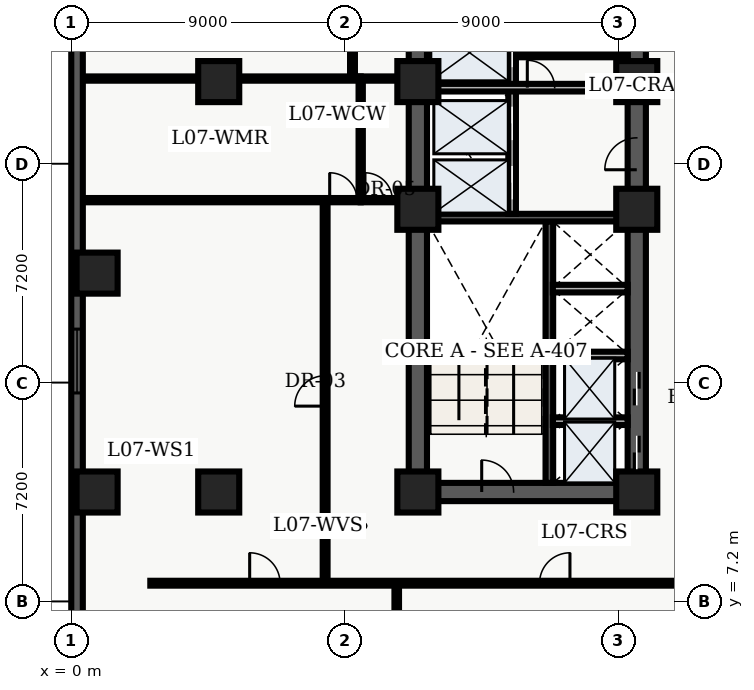
"""IFC4 building model, lengths in metres.
Left out: names, types, materials, properties, quantities, classifications, styles, units other than length and angle.
Written with IfcOpenShell. Run it as: python <this file> out.ifc"""

import sys

from ifc_helpers import new_model, entity, si_unit, converted_unit, direction, frame, origin_with_axes, origin_2d_with_axis, place, context, subcontext, project, spatial, polyline, rectangle, outline, extrude, element, fill, save


model = new_model("IFC4")
c1 = context("Model", 3, precision=1e-05, world=origin_with_axes(), true_north=direction((0.0, 1.0)))
c2 = subcontext(c1, "Body", "Model", "MODEL_VIEW")
j1 = project(units=[si_unit("LENGTHUNIT", "METRE"), converted_unit("PLANEANGLEUNIT", "DEGREE", entity("IfcPlaneAngleMeasure", 0.017), si_unit("PLANEANGLEUNIT", "RADIAN"), dimensions=[0, 0, 0, 0, 0, 0, 0])], contexts=[c1])
p1 = place(None, origin_with_axes())
s1 = spatial("IfcSite", under=j1, at=p1, CompositionType="ELEMENT")
p2 = place(p1, origin_with_axes())
s2 = spatial("IfcBuilding", under=s1, at=p2, CompositionType="ELEMENT")
p3 = place(p2, frame((0.0, 0.0, 32.7), z_axis=(0.0, 0.0, 1.0), x_axis=(1.0, 0.0, 0.0)))
s3 = spatial("IfcBuildingStorey", under=s2, at=p3, CompositionType="ELEMENT", Elevation=32.7)
p4 = place(p3, frame((11.4, 10.8, 0.0), z_axis=(0.0, 0.0, 1.0), x_axis=(0.0, 1.0, 0.0)))
e1 = element("IfcWall", 1, at=p4, inside=s3, PredefinedType="SHEAR", context=c2, shape_type="SweptSolid", body=[
    extrude(outline(polyline([(0.0, -0.3), (27.0, -0.3), (27.0, 0.3), (0.0, 0.3), (0.0, -0.3)])), origin_with_axes(), (0.0, 0.0, 1.0), 3.66),
])
p5 = place(p3, frame((11.4, 10.8, 0.0), z_axis=(0.0, 0.0, 1.0), x_axis=(1.0, 0.0, 0.0)))
e2 = element("IfcWall", 2, at=p5, inside=s3, PredefinedType="SHEAR", context=c2, shape_type="SweptSolid", body=[
    extrude(outline(polyline([(0.0, -0.3), (7.2, -0.3), (7.2, 0.3), (0.0, 0.3), (0.0, -0.3)])), origin_with_axes(), (0.0, 0.0, 1.0), 3.66),
])
p6 = place(p5, frame((2.625, 0.0, 0.0), z_axis=(0.0, 0.0, 1.0), x_axis=(1.0, 0.0, 0.0)))
e3 = element("IfcOpeningElement", 3, at=p6, cuts=e2, PredefinedType="OPENING", context=c2, shape_type="SweptSolid", body=[
    extrude(rectangle(XDim=1.05, YDim=0.62, at=origin_2d_with_axis()), origin_with_axes(), (0.0, 0.0, 1.0), 2.15),
])
p7 = place(p3, frame((18.6, 10.8, 0.0), z_axis=(0.0, 0.0, 1.0), x_axis=(0.0, 1.0, 0.0)))
e4 = element("IfcWall", 4, at=p7, inside=s3, PredefinedType="SHEAR", context=c2, shape_type="SweptSolid", body=[
    extrude(outline(polyline([(0.0, -0.3), (13.5, -0.3), (13.5, 0.3), (0.0, 0.3), (0.0, -0.3)])), origin_with_axes(), (0.0, 0.0, 1.0), 3.66),
])
p8 = place(p7, frame((1.3, 0.0, 0.0), z_axis=(0.0, 0.0, 1.0), x_axis=(1.0, 0.0, 0.0)))
e5 = element("IfcOpeningElement", 5, at=p8, cuts=e4, PredefinedType="OPENING", context=c2, shape_type="SweptSolid", body=[
    extrude(rectangle(XDim=1.1, YDim=0.62, at=origin_2d_with_axis()), origin_with_axes(), (0.0, 0.0, 1.0), 2.15),
])
p9 = place(p7, frame((3.4, 0.0, 0.0), z_axis=(0.0, 0.0, 1.0), x_axis=(1.0, 0.0, 0.0)))
e6 = element("IfcOpeningElement", 6, at=p9, cuts=e4, PredefinedType="OPENING", context=c2, shape_type="SweptSolid", body=[
    extrude(rectangle(XDim=1.1, YDim=0.62, at=origin_2d_with_axis()), origin_with_axes(), (0.0, 0.0, 1.0), 2.15),
])
p10 = place(p7, frame((11.125, 0.0, 0.0), z_axis=(0.0, 0.0, 1.0), x_axis=(1.0, 0.0, 0.0)))
e7 = element("IfcOpeningElement", 7, at=p10, cuts=e4, PredefinedType="OPENING", context=c2, shape_type="SweptSolid", body=[
    extrude(rectangle(XDim=1.05, YDim=0.62, at=origin_2d_with_axis()), origin_with_axes(), (0.0, 0.0, 1.0), 2.15),
])
p11 = place(p3, frame((18.6, 24.3, 0.0), z_axis=(0.0, 0.0, 1.0), x_axis=(0.0, 1.0, 0.0)))
e8 = element("IfcWall", 8, at=p11, inside=s3, PredefinedType="SHEAR", context=c2, shape_type="SweptSolid", body=[
    extrude(outline(polyline([(0.0, -0.3), (13.5, -0.3), (13.5, 0.3), (0.0, 0.3), (0.0, -0.3)])), origin_with_axes(), (0.0, 0.0, 1.0), 3.66),
])
p12 = place(p11, frame((6.025, 0.0, 0.0), z_axis=(0.0, 0.0, 1.0), x_axis=(1.0, 0.0, 0.0)))
e9 = element("IfcOpeningElement", 9, at=p12, cuts=e8, PredefinedType="OPENING", context=c2, shape_type="SweptSolid", body=[
    extrude(rectangle(XDim=0.95, YDim=0.62, at=origin_2d_with_axis()), origin_with_axes(), (0.0, 0.0, 1.0), 2.15),
])
p13 = place(p11, frame((7.825, 0.0, 0.0), z_axis=(0.0, 0.0, 1.0), x_axis=(1.0, 0.0, 0.0)))
e10 = element("IfcOpeningElement", 10, at=p13, cuts=e8, PredefinedType="OPENING", context=c2, shape_type="SweptSolid", body=[
    extrude(rectangle(XDim=0.95, YDim=0.62, at=origin_2d_with_axis()), origin_with_axes(), (0.0, 0.0, 1.0), 2.15),
])
p14 = place(p3, frame((15.725, 11.1, 0.0), z_axis=(0.0, 0.0, 1.0), x_axis=(0.0, 1.0, 0.0)))
e11 = element("IfcWall", 11, at=p14, inside=s3, PredefinedType="SHEAR", context=c2, shape_type="SweptSolid", body=[
    extrude(outline(polyline([(0.0, -0.125), (8.6, -0.125), (8.6, 0.125), (0.0, 0.125), (0.0, -0.125)])), origin_with_axes(), (0.0, 0.0, 1.0), 3.66),
])
p15 = place(p3, frame((11.7, 19.825, 0.0), z_axis=(0.0, 0.0, 1.0), x_axis=(1.0, 0.0, 0.0)))
e12 = element("IfcWall", 12, at=p15, inside=s3, PredefinedType="SHEAR", context=c2, shape_type="SweptSolid", body=[
    extrude(outline(polyline([(0.0, -0.125), (6.6, -0.125), (6.6, 0.125), (0.0, 0.125), (0.0, -0.125)])), origin_with_axes(), (0.0, 0.0, 1.0), 3.66),
])
p16 = place(p3, frame((14.5, 19.95, 0.0), z_axis=(0.0, 0.0, 1.0), x_axis=(0.0, 1.0, 0.0)))
e13 = element("IfcWall", 13, at=p16, inside=s3, PredefinedType="SOLIDWALL", context=c2, shape_type="SweptSolid", body=[
    extrude(outline(polyline([(0.0, -0.125), (6.25, -0.125), (6.25, 0.125), (0.0, 0.125), (0.0, -0.125)])), origin_with_axes(), (0.0, 0.0, 1.0), 2.7),
])
p17 = place(p16, frame((1.025, 0.0, 0.0), z_axis=(0.0, 0.0, 1.0), x_axis=(1.0, 0.0, 0.0)))
e14 = element("IfcOpeningElement", 14, at=p17, cuts=e13, PredefinedType="OPENING", context=c2, shape_type="SweptSolid", body=[
    extrude(rectangle(XDim=1.1, YDim=0.27, at=origin_2d_with_axis()), origin_with_axes(), (0.0, 0.0, 1.0), 2.15),
])
p18 = place(p16, frame((2.975, 0.0, 0.0), z_axis=(0.0, 0.0, 1.0), x_axis=(1.0, 0.0, 0.0)))
e15 = element("IfcOpeningElement", 15, at=p18, cuts=e13, PredefinedType="OPENING", context=c2, shape_type="SweptSolid", body=[
    extrude(rectangle(XDim=1.1, YDim=0.27, at=origin_2d_with_axis()), origin_with_axes(), (0.0, 0.0, 1.0), 2.15),
])
p19 = place(p16, frame((5.425, 0.0, 0.0), z_axis=(0.0, 0.0, 1.0), x_axis=(1.0, 0.0, 0.0)))
e16 = element("IfcOpeningElement", 16, at=p19, cuts=e13, PredefinedType="OPENING", context=c2, shape_type="SweptSolid", body=[
    extrude(rectangle(XDim=1.2, YDim=0.27, at=origin_2d_with_axis()), origin_with_axes(), (0.0, 0.0, 1.0), 2.15),
])
p20 = place(p3, frame((11.7, 24.1, 0.0), z_axis=(0.0, 0.0, 1.0), x_axis=(1.0, 0.0, 0.0)))
e17 = element("IfcWall", 17, at=p20, inside=s3, PredefinedType="SOLIDWALL", context=c2, shape_type="SweptSolid", body=[
    extrude(outline(polyline([(0.0, -0.125), (6.6, -0.125), (6.6, 0.125), (0.0, 0.125), (0.0, -0.125)])), origin_with_axes(), (0.0, 0.0, 1.0), 2.7),
])
p21 = place(p20, frame((3.75, 0.0, 0.0), z_axis=(0.0, 0.0, 1.0), x_axis=(1.0, 0.0, 0.0)))
e18 = element("IfcOpeningElement", 18, at=p21, cuts=e17, PredefinedType="OPENING", context=c2, shape_type="SweptSolid", body=[
    extrude(rectangle(XDim=0.9, YDim=0.27, at=origin_2d_with_axis()), origin_with_axes(), (0.0, 0.0, 1.0), 2.15),
])
for number, where, z_axis, x_axis in (
    (19, (11.4, 10.8, 0.0), (0.0, 0.0, 1.0), (1.0, 0.0, 0.0)),
    (20, (11.4, 20.1, 0.0), (0.0, 0.0, 1.0), (1.0, 0.0, 0.0)),
    (21, (11.4, 24.3, 0.0), (0.0, 0.0, 1.0), (1.0, 0.0, 0.0)),
    (22, (18.6, 10.8, 0.0), (0.0, 0.0, 1.0), (1.0, 0.0, 0.0)),
    (23, (18.6, 20.1, 0.0), (0.0, 0.0, 1.0), (1.0, 0.0, 0.0)),
    (24, (18.6, 24.3, 0.0), (0.0, 0.0, 1.0), (1.0, 0.0, 0.0)),
    (25, (4.85, 10.8, 0.0), (0.0, 0.0, 1.0), (1.0, 0.0, 0.0)),
    (26, (4.85, 24.3, 0.0), (0.0, 0.0, 1.0), (1.0, 0.0, 0.0)),
    (27, (0.85, 10.8, 0.0), (0.0, 0.0, 1.0), (1.0, 0.0, 0.0)),
    (28, (0.85, 18.0, 0.0), (0.0, 0.0, 1.0), (1.0, 0.0, 0.0)),
):
    element("IfcColumn", number, at=place(p3, frame(where, z_axis=z_axis, x_axis=x_axis)), inside=s3, PredefinedType="COLUMN", context=c2, shape_type="SweptSolid", body=[
        extrude(rectangle(XDim=1.35, YDim=1.35, at=origin_2d_with_axis()), origin_with_axes(), (0.0, 0.0, 1.0), 3.9),
    ])
p22 = place(p3, frame((14.62, 25.18, 0.0), z_axis=(0.0, 0.0, 1.0), x_axis=(1.0, 0.0, 0.0)))
e29 = element("IfcWall", 29, at=p22, inside=s3, PredefinedType="PARTITIONING", context=c2, shape_type="SweptSolid", body=[
    extrude(outline(polyline([(0.0, -0.08), (3.68, -0.08), (3.68, 0.08), (0.0, 0.08), (0.0, -0.08)])), origin_with_axes(), (0.0, 0.0, 1.0), 2.7),
])
p23 = place(p22, frame((1.95, 0.0, 0.0), z_axis=(0.0, 0.0, 1.0), x_axis=(1.0, 0.0, 0.0)))
e30 = element("IfcOpeningElement", 30, at=p23, cuts=e29, PredefinedType="OPENING", context=c2, shape_type="SweptSolid", body=[
    extrude(rectangle(XDim=0.9, YDim=0.18, at=origin_2d_with_axis()), origin_with_axes(), (0.0, 0.0, 1.0), 2.15),
])
for number, where, z_axis, x_axis in (
    (31, (15.84, 13.13, 0.0), (0.0, 0.0, 1.0), (1.0, 0.0, 0.0)),
    (32, (15.84, 15.29, 0.0), (0.0, 0.0, 1.0), (1.0, 0.0, 0.0)),
    (33, (15.84, 17.49, 0.0), (0.0, 0.0, 1.0), (1.0, 0.0, 0.0)),
):
    element("IfcWall", number, at=place(p3, frame(where, z_axis=z_axis, x_axis=x_axis)), inside=s3, PredefinedType="SOLIDWALL", context=c2, shape_type="SweptSolid", body=[
        extrude(outline(polyline([(0.0, -0.125), (2.46, -0.125), (2.46, 0.125), (0.0, 0.125), (0.0, -0.125)])), origin_with_axes(), (0.0, 0.0, 1.0), 2.7),
    ])
p24 = place(p3, frame((9.52, 20.4, 0.0), z_axis=(0.0, 0.0, 1.0), x_axis=(0.0, 1.0, 0.0)))
e34 = element("IfcWall", 34, at=p24, inside=s3, PredefinedType="PARTITIONING", context=c2, shape_type="SweptSolid", body=[
    extrude(outline(polyline([(0.0, -0.07), (4.0, -0.07), (4.0, 0.07), (0.0, 0.07), (0.0, -0.07)])), origin_with_axes(), (0.0, 0.0, 1.0), 2.7),
])
p25 = place(p3, frame((9.52, 20.4, 0.0), z_axis=(0.0, 0.0, 1.0), x_axis=(1.0, 0.0, 0.0)))
e35 = element("IfcWall", 35, at=p25, inside=s3, PredefinedType="PARTITIONING", context=c2, shape_type="SweptSolid", body=[
    extrude(outline(polyline([(0.0, -0.07), (1.58, -0.07), (1.58, 0.07), (0.0, 0.07), (0.0, -0.07)])), origin_with_axes(), (0.0, 0.0, 1.0), 2.7),
])
p26 = place(p25, frame((0.59, 0.0, 0.0), z_axis=(0.0, 0.0, 1.0), x_axis=(1.0, 0.0, 0.0)))
e36 = element("IfcOpeningElement", 36, at=p26, cuts=e35, PredefinedType="OPENING", context=c2, shape_type="SweptSolid", body=[
    extrude(rectangle(XDim=0.9, YDim=0.16, at=origin_2d_with_axis()), origin_with_axes(), (0.0, 0.0, 1.0), 2.15),
])
p27 = place(p3, frame((9.52, 24.4, 0.0), z_axis=(0.0, 0.0, 1.0), x_axis=(1.0, 0.0, 0.0)))
e37 = element("IfcWall", 37, at=p27, inside=s3, PredefinedType="PARTITIONING", context=c2, shape_type="SweptSolid", body=[
    extrude(outline(polyline([(0.0, -0.07), (1.58, -0.07), (1.58, 0.07), (0.0, 0.07), (0.0, -0.07)])), origin_with_axes(), (0.0, 0.0, 1.0), 2.7),
])
p28 = place(p3, frame((2.6, 7.8, 0.0), z_axis=(0.0, 0.0, 1.0), x_axis=(1.0, 0.0, 0.0)))
e38 = element("IfcWall", 38, at=p28, inside=s3, PredefinedType="PARTITIONING", context=c2, shape_type="SweptSolid", body=[
    extrude(outline(polyline([(0.0, -0.08), (18.55, -0.08), (18.55, 0.08), (0.0, 0.08), (0.0, -0.08)])), origin_with_axes(), (0.0, 0.0, 1.0), 2.7),
])
p29 = place(p28, frame((3.768, 0.0, 0.0), z_axis=(0.0, 0.0, 1.0), x_axis=(1.0, 0.0, 0.0)))
e39 = element("IfcOpeningElement", 39, at=p29, cuts=e38, PredefinedType="OPENING", context=c2, shape_type="SweptSolid", body=[
    extrude(rectangle(XDim=1.0, YDim=0.18, at=origin_2d_with_axis()), origin_with_axes(), (0.0, 0.0, 1.0), 2.15),
])
p30 = place(p28, frame((13.303, 0.0, 0.0), z_axis=(0.0, 0.0, 1.0), x_axis=(1.0, 0.0, 0.0)))
e40 = element("IfcOpeningElement", 40, at=p30, cuts=e38, PredefinedType="OPENING", context=c2, shape_type="SweptSolid", body=[
    extrude(rectangle(XDim=1.0, YDim=0.18, at=origin_2d_with_axis()), origin_with_axes(), (0.0, 0.0, 1.0), 2.15),
])
p31 = place(p3, frame((8.35, 7.8, 0.0), z_axis=(0.0, 0.0, 1.0), x_axis=(0.0, 1.0, 0.0)))
e41 = element("IfcWall", 41, at=p31, inside=s3, PredefinedType="PARTITIONING", context=c2, shape_type="SweptSolid", body=[
    extrude(outline(polyline([(0.0, -0.08), (12.6, -0.08), (12.6, 0.08), (0.0, 0.08), (0.0, -0.08)])), origin_with_axes(), (0.0, 0.0, 1.0), 2.7),
])
p32 = place(p31, frame((6.325, 0.0, 0.0), z_axis=(0.0, 0.0, 1.0), x_axis=(1.0, 0.0, 0.0)))
e42 = element("IfcOpeningElement", 42, at=p32, cuts=e41, PredefinedType="OPENING", context=c2, shape_type="SweptSolid", body=[
    extrude(rectangle(XDim=1.0, YDim=0.18, at=origin_2d_with_axis()), origin_with_axes(), (0.0, 0.0, 1.0), 2.15),
])
p33 = place(p3, frame((9.25, 24.4, 0.0), z_axis=(0.0, 0.0, 1.0), x_axis=(0.0, 1.0, 0.0)))
e43 = element("IfcWall", 43, at=p33, inside=s3, PredefinedType="PARTITIONING", context=c2, shape_type="SweptSolid", body=[
    extrude(outline(polyline([(0.0, -0.08), (16.1, -0.08), (16.1, 0.08), (0.0, 0.08), (0.0, -0.08)])), origin_with_axes(), (0.0, 0.0, 1.0), 2.7),
])
p34 = place(p33, frame((5.853, 0.0, 0.0), z_axis=(0.0, 0.0, 1.0), x_axis=(1.0, 0.0, 0.0)))
e44 = element("IfcOpeningElement", 44, at=p34, cuts=e43, PredefinedType="OPENING", context=c2, shape_type="SweptSolid", body=[
    extrude(rectangle(XDim=1.0, YDim=0.18, at=origin_2d_with_axis()), origin_with_axes(), (0.0, 0.0, 1.0), 2.15),
])
p35 = place(p33, frame((10.768, 0.0, 0.0), z_axis=(0.0, 0.0, 1.0), x_axis=(1.0, 0.0, 0.0)))
e45 = element("IfcOpeningElement", 45, at=p35, cuts=e43, PredefinedType="OPENING", context=c2, shape_type="SweptSolid", body=[
    extrude(rectangle(XDim=1.0, YDim=0.18, at=origin_2d_with_axis()), origin_with_axes(), (0.0, 0.0, 1.0), 2.15),
])
p36 = place(p3, frame((0.36, 20.4, 0.0), z_axis=(0.0, 0.0, 1.0), x_axis=(1.0, 0.0, 0.0)))
e46 = element("IfcWall", 46, at=p36, inside=s3, PredefinedType="PARTITIONING", context=c2, shape_type="SweptSolid", body=[
    extrude(outline(polyline([(0.0, -0.07), (9.16, -0.07), (9.16, 0.07), (0.0, 0.07), (0.0, -0.07)])), origin_with_axes(), (0.0, 0.0, 1.0), 2.7),
])
p37 = place(p36, frame((8.59, 0.0, 0.0), z_axis=(0.0, 0.0, 1.0), x_axis=(1.0, 0.0, 0.0)))
e47 = element("IfcOpeningElement", 47, at=p37, cuts=e46, PredefinedType="OPENING", context=c2, shape_type="SweptSolid", body=[
    extrude(rectangle(XDim=0.9, YDim=0.16, at=origin_2d_with_axis()), origin_with_axes(), (0.0, 0.0, 1.0), 2.15),
])
p38 = place(p3, frame((0.36, 24.4, 0.0), z_axis=(0.0, 0.0, 1.0), x_axis=(1.0, 0.0, 0.0)))
e48 = element("IfcWall", 48, at=p38, inside=s3, PredefinedType="PARTITIONING", context=c2, shape_type="SweptSolid", body=[
    extrude(outline(polyline([(0.0, -0.07), (9.16, -0.07), (9.16, 0.07), (0.0, 0.07), (0.0, -0.07)])), origin_with_axes(), (0.0, 0.0, 1.0), 2.7),
])
p39 = place(p3, frame((10.705, 0.36, 0.0), z_axis=(0.0, 0.0, 1.0), x_axis=(0.0, 1.0, 0.0)))
e49 = element("IfcWall", 49, at=p39, inside=s3, PredefinedType="PARTITIONING", context=c2, shape_type="SweptSolid", body=[
    extrude(outline(polyline([(0.0, -0.075), (7.34, -0.075), (7.34, 0.075), (0.0, 0.075), (0.0, -0.075)])), origin_with_axes(), (0.0, 0.0, 1.0), 2.7),
])
p40 = place(p3, frame((0.19, 2.78, 0.0), z_axis=(0.0, 0.0, 1.0), x_axis=(0.0, 1.0, 0.0)))
e50 = element("IfcWall", 50, at=p40, inside=s3, PredefinedType="SOLIDWALL", context=c2, shape_type="SweptSolid", body=[
    extrude(outline(polyline([(0.0, -0.19), (43.42, -0.19), (43.42, 0.19), (0.0, 0.19), (0.0, -0.19)])), origin_with_axes(), (0.0, 0.0, 1.0), 3.66),
])
p41 = place(p40, frame((2.946, 0.0, 0.45), z_axis=(0.0, 0.0, 1.0), x_axis=(1.0, 0.0, 0.0)))
e51 = element("IfcOpeningElement", 51, at=p41, cuts=e50, PredefinedType="OPENING", context=c2, shape_type="SweptSolid", body=[
    extrude(rectangle(XDim=2.1, YDim=0.4, at=origin_2d_with_axis()), origin_with_axes(), (0.0, 0.0, 1.0), 2.2),
])
p42 = place(p40, frame((12.328, 0.0, 0.45), z_axis=(0.0, 0.0, 1.0), x_axis=(1.0, 0.0, 0.0)))
e52 = element("IfcOpeningElement", 52, at=p42, cuts=e50, PredefinedType="OPENING", context=c2, shape_type="SweptSolid", body=[
    extrude(rectangle(XDim=2.1, YDim=0.4, at=origin_2d_with_axis()), origin_with_axes(), (0.0, 0.0, 1.0), 2.2),
])
p43 = place(p40, frame((26.401, 0.0, 0.45), z_axis=(0.0, 0.0, 1.0), x_axis=(1.0, 0.0, 0.0)))
e53 = element("IfcOpeningElement", 53, at=p43, cuts=e50, PredefinedType="OPENING", context=c2, shape_type="SweptSolid", body=[
    extrude(rectangle(XDim=2.1, YDim=0.4, at=origin_2d_with_axis()), origin_with_axes(), (0.0, 0.0, 1.0), 2.2),
])
p44 = place(p40, frame((31.092, 0.0, 0.45), z_axis=(0.0, 0.0, 1.0), x_axis=(1.0, 0.0, 0.0)))
e54 = element("IfcOpeningElement", 54, at=p44, cuts=e50, PredefinedType="OPENING", context=c2, shape_type="SweptSolid", body=[
    extrude(rectangle(XDim=2.1, YDim=0.4, at=origin_2d_with_axis()), origin_with_axes(), (0.0, 0.0, 1.0), 2.2),
])
p45 = place(p40, frame((40.024, 0.0, 0.45), z_axis=(0.0, 0.0, 1.0), x_axis=(1.0, 0.0, 0.0)))
e55 = element("IfcOpeningElement", 55, at=p45, cuts=e50, PredefinedType="OPENING", context=c2, shape_type="SweptSolid", body=[
    extrude(rectangle(XDim=2.1, YDim=0.4, at=origin_2d_with_axis()), origin_with_axes(), (0.0, 0.0, 1.0), 2.2),
])
p46 = place(p7, frame((1.3, 0.0, 0.0), z_axis=(0.0, 0.0, 1.0), x_axis=(1.0, 0.0, 0.0)))
e56 = element("IfcDoor", 56, at=p46, inside=s3, OperationType="SLIDING_TO_LEFT", PredefinedType="DOOR", context=c2, shape_type="SweptSolid", body=[
    extrude(rectangle(XDim=1.1, YDim=0.09, at=origin_2d_with_axis()), origin_with_axes(), (0.0, 0.0, 1.0), 2.15),
])
fill(e5, e56)
p47 = place(p7, frame((3.4, 0.0, 0.0), z_axis=(0.0, 0.0, 1.0), x_axis=(1.0, 0.0, 0.0)))
e57 = element("IfcDoor", 57, at=p47, inside=s3, OperationType="SLIDING_TO_RIGHT", PredefinedType="DOOR", context=c2, shape_type="SweptSolid", body=[
    extrude(rectangle(XDim=1.1, YDim=0.09, at=origin_2d_with_axis()), origin_with_axes(), (0.0, 0.0, 1.0), 2.15),
])
fill(e6, e57)
p48 = place(p16, frame((1.025, 0.0, 0.0), z_axis=(0.0, 0.0, 1.0), x_axis=(1.0, 0.0, 0.0)))
e58 = element("IfcDoor", 58, at=p48, inside=s3, OperationType="SLIDING_TO_LEFT", PredefinedType="DOOR", context=c2, shape_type="SweptSolid", body=[
    extrude(rectangle(XDim=1.1, YDim=0.09, at=origin_2d_with_axis()), origin_with_axes(), (0.0, 0.0, 1.0), 2.15),
])
fill(e14, e58)
p49 = place(p16, frame((2.975, 0.0, 0.0), z_axis=(0.0, 0.0, 1.0), x_axis=(1.0, 0.0, 0.0)))
e59 = element("IfcDoor", 59, at=p49, inside=s3, OperationType="SLIDING_TO_RIGHT", PredefinedType="DOOR", context=c2, shape_type="SweptSolid", body=[
    extrude(rectangle(XDim=1.1, YDim=0.09, at=origin_2d_with_axis()), origin_with_axes(), (0.0, 0.0, 1.0), 2.15),
])
fill(e15, e59)
p50 = place(p16, frame((5.425, 0.0, 0.0), z_axis=(0.0, 0.0, 1.0), x_axis=(1.0, 0.0, 0.0)))
e60 = element("IfcDoor", 60, at=p50, inside=s3, OperationType="DOUBLE_DOOR_SLIDING", PredefinedType="DOOR", context=c2, shape_type="SweptSolid", body=[
    extrude(rectangle(XDim=1.2, YDim=0.09, at=origin_2d_with_axis()), origin_with_axes(), (0.0, 0.0, 1.0), 2.15),
])
fill(e16, e60)
p51 = place(p5, frame((2.625, 0.0, 0.0), z_axis=(0.0, 0.0, 1.0), x_axis=(1.0, 0.0, 0.0)))
e61 = element("IfcDoor", 61, at=p51, inside=s3, OperationType="SINGLE_SWING_LEFT", PredefinedType="DOOR", context=c2, shape_type="SweptSolid", body=[
    extrude(rectangle(XDim=1.05, YDim=0.09, at=origin_2d_with_axis()), origin_with_axes(), (0.0, 0.0, 1.0), 2.15),
])
fill(e3, e61)
p52 = place(p7, frame((11.125, 0.0, 0.0), z_axis=(0.0, 0.0, 1.0), x_axis=(1.0, 0.0, 0.0)))
e62 = element("IfcDoor", 62, at=p52, inside=s3, OperationType="SINGLE_SWING_LEFT", PredefinedType="DOOR", context=c2, shape_type="SweptSolid", body=[
    extrude(rectangle(XDim=1.05, YDim=0.09, at=origin_2d_with_axis()), origin_with_axes(), (0.0, 0.0, 1.0), 2.15),
])
fill(e7, e62)
p53 = place(p20, frame((3.75, 0.0, 0.0), z_axis=(0.0, 0.0, 1.0), x_axis=(1.0, 0.0, 0.0)))
e63 = element("IfcDoor", 63, at=p53, inside=s3, OperationType="SINGLE_SWING_LEFT", PredefinedType="DOOR", context=c2, shape_type="SweptSolid", body=[
    extrude(rectangle(XDim=0.9, YDim=0.09, at=origin_2d_with_axis()), origin_with_axes(), (0.0, 0.0, 1.0), 2.15),
])
fill(e18, e63)
p54 = place(p22, frame((1.95, 0.0, 0.0), z_axis=(0.0, 0.0, 1.0), x_axis=(1.0, 0.0, 0.0)))
e64 = element("IfcDoor", 64, at=p54, inside=s3, OperationType="SINGLE_SWING_LEFT", PredefinedType="DOOR", context=c2, shape_type="SweptSolid", body=[
    extrude(rectangle(XDim=0.9, YDim=0.09, at=origin_2d_with_axis()), origin_with_axes(), (0.0, 0.0, 1.0), 2.15),
])
fill(e30, e64)
p55 = place(p25, frame((0.59, 0.0, 0.0), z_axis=(0.0, 0.0, 1.0), x_axis=(1.0, 0.0, 0.0)))
e65 = element("IfcDoor", 65, at=p55, inside=s3, OperationType="SINGLE_SWING_LEFT", PredefinedType="DOOR", context=c2, shape_type="SweptSolid", body=[
    extrude(rectangle(XDim=0.9, YDim=0.084, at=origin_2d_with_axis()), origin_with_axes(), (0.0, 0.0, 1.0), 2.15),
])
fill(e36, e65)
p56 = place(p36, frame((8.59, 0.0, 0.0), z_axis=(0.0, 0.0, 1.0), x_axis=(1.0, 0.0, 0.0)))
e66 = element("IfcDoor", 66, at=p56, inside=s3, OperationType="SINGLE_SWING_LEFT", PredefinedType="DOOR", context=c2, shape_type="SweptSolid", body=[
    extrude(rectangle(XDim=0.9, YDim=0.084, at=origin_2d_with_axis()), origin_with_axes(), (0.0, 0.0, 1.0), 2.15),
])
fill(e47, e66)
p57 = place(p31, frame((6.325, 0.0, 0.0), z_axis=(0.0, 0.0, 1.0), x_axis=(1.0, 0.0, 0.0)))
e67 = element("IfcDoor", 67, at=p57, inside=s3, OperationType="SINGLE_SWING_LEFT", PredefinedType="DOOR", context=c2, shape_type="SweptSolid", body=[
    extrude(rectangle(XDim=1.0, YDim=0.09, at=origin_2d_with_axis()), origin_with_axes(), (0.0, 0.0, 1.0), 2.15),
])
fill(e42, e67)
p58 = place(p28, frame((3.768, 0.0, 0.0), z_axis=(0.0, 0.0, 1.0), x_axis=(1.0, 0.0, 0.0)))
e68 = element("IfcDoor", 68, at=p58, inside=s3, OperationType="SINGLE_SWING_LEFT", PredefinedType="DOOR", context=c2, shape_type="SweptSolid", body=[
    extrude(rectangle(XDim=1.0, YDim=0.09, at=origin_2d_with_axis()), origin_with_axes(), (0.0, 0.0, 1.0), 2.15),
])
fill(e39, e68)
p59 = place(p28, frame((13.303, 0.0, 0.0), z_axis=(0.0, 0.0, 1.0), x_axis=(1.0, 0.0, 0.0)))
e69 = element("IfcDoor", 69, at=p59, inside=s3, OperationType="SINGLE_SWING_RIGHT", PredefinedType="DOOR", context=c2, shape_type="SweptSolid", body=[
    extrude(rectangle(XDim=1.0, YDim=0.09, at=origin_2d_with_axis()), origin_with_axes(), (0.0, 0.0, 1.0), 2.15),
])
fill(e40, e69)
p60 = place(p40, frame((12.328, 0.0, 0.45), z_axis=(0.0, 0.0, 1.0), x_axis=(1.0, 0.0, 0.0)))
e70 = element("IfcWindow", 70, at=p60, inside=s3, PredefinedType="WINDOW", context=c2, shape_type="SweptSolid", body=[
    extrude(rectangle(XDim=2.1, YDim=0.09, at=origin_2d_with_axis()), origin_with_axes(), (0.0, 0.0, 1.0), 2.2),
])
fill(e52, e70)
save(model, sys.argv[1])
